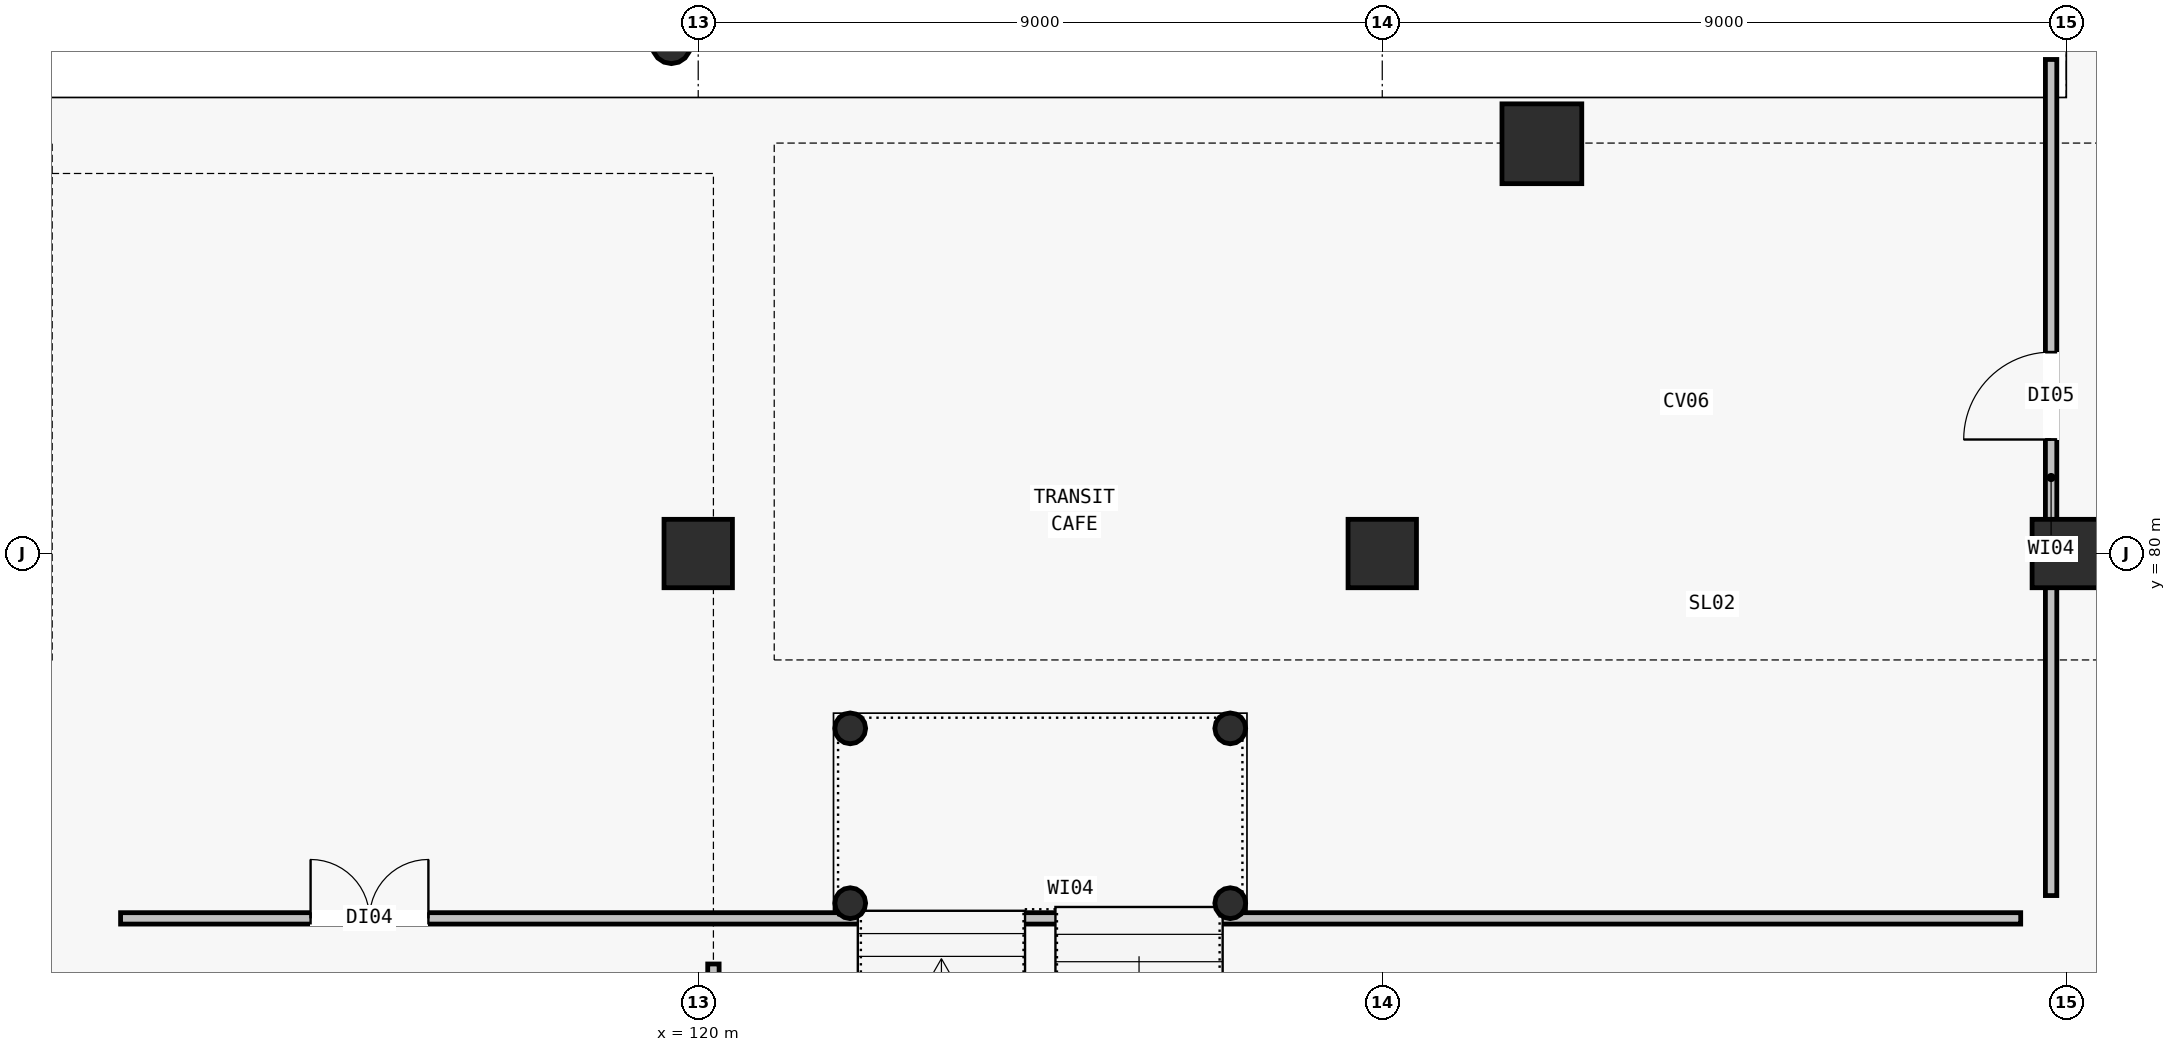
"""IFC4 building model, lengths in metres.
Left out: names, types, materials, properties, quantities, classifications, styles, units other than length and angle.
Written with IfcOpenShell. Run it as: python <this file> out.ifc"""

import sys

from ifc_helpers import new_model, si_unit, direction, frame, frame_2d, origin, origin_2d, place, context, subcontext, project, spatial, rectangle, hollow_circle, extrude, element, fill, save


model = new_model("IFC4")
c1 = context("Model", 3, precision=1e-05, world=origin(), true_north=direction((0.0, 1.0)))
c2 = subcontext(c1, "Body", "Model", "MODEL_VIEW")
j1 = project(units=[si_unit("LENGTHUNIT", "METRE"), si_unit("PLANEANGLEUNIT", "RADIAN")], contexts=[c1])
p1 = place(None, origin())
s1 = spatial("IfcSite", under=j1, at=p1, CompositionType="ELEMENT")
p2 = place(p1, origin())
s2 = spatial("IfcBuilding", under=s1, at=p2, CompositionType="ELEMENT")
p3 = place(p2, origin())
s3 = spatial("IfcBuildingStorey", under=s2, at=p3, CompositionType="ELEMENT", Elevation=0.0)
p4 = place(p3, frame((131.1, 85.391, -0.9), z_axis=(0.0, 0.0, 1.0), x_axis=(1.0, 0.0, 0.0)))
e1 = element("IfcColumn", 1, at=p4, inside=s3, PredefinedType="COLUMN", context=c2, shape_type="SweptSolid", body=[
    extrude(rectangle(XDim=1.05, YDim=1.05, at=origin_2d()), origin(), (0.0, 0.0, 1.0), 6.5),
])
p5 = place(p3, frame((119.647, 86.699, -0.9), z_axis=(0.0, 0.0, 1.0), x_axis=(1.0, 0.0, 0.0)))
e2 = element("IfcColumn", 2, at=p5, inside=s3, PredefinedType="COLUMN", context=c2, shape_type="SweptSolid", body=[
    extrude(hollow_circle(Radius=0.254, WallThickness=0.016, at=origin_2d()), origin(), (0.0, 0.0, 1.0), 6.5),
])
for number, where, z_axis, x_axis in (
    (3, (120.0, 80.0, -0.9), (0.0, 0.0, 1.0), (1.0, 0.0, 0.0)),
    (4, (129.0, 80.0, -0.9), (0.0, 0.0, 1.0), (1.0, 0.0, 0.0)),
    (5, (138.0, 80.0, -0.9), (0.0, 0.0, 1.0), (1.0, 0.0, 0.0)),
):
    element("IfcColumn", number, at=place(p3, frame(where, z_axis=z_axis, x_axis=x_axis)), inside=s3, PredefinedType="COLUMN", context=c2, shape_type="SweptSolid", body=[
        extrude(rectangle(XDim=0.9, YDim=0.9, at=origin_2d()), origin(), (0.0, 0.0, 1.0), 6.5),
    ])
for number, where, z_axis, x_axis in (
    (6, (122.0, 75.4, -0.9), (0.0, 0.0, 1.0), (1.0, 0.0, 0.0)),
    (7, (122.0, 77.7, -0.9), (0.0, 0.0, 1.0), (1.0, 0.0, 0.0)),
    (8, (127.0, 75.4, -0.9), (0.0, 0.0, 1.0), (1.0, 0.0, 0.0)),
    (9, (127.0, 77.7, -0.9), (0.0, 0.0, 1.0), (1.0, 0.0, 0.0)),
):
    element("IfcColumn", number, at=place(p3, frame(where, z_axis=z_axis, x_axis=x_axis)), inside=s3, PredefinedType="COLUMN", context=c2, shape_type="SweptSolid", body=[
        extrude(hollow_circle(Radius=0.203, WallThickness=0.014, at=origin_2d()), origin(), (0.0, 0.0, 1.0), 3.48),
    ])
p6 = place(p3, frame((120.2, 64.5, 0.0), z_axis=(0.0, 0.0, 1.0), x_axis=(0.0, 1.0, 0.0)))
e10 = element("IfcWall", 10, at=p6, inside=s3, PredefinedType="PARTITIONING", context=c2, shape_type="SweptSolid", body=[
    extrude(rectangle(XDim=10.1, YDim=0.15, at=frame_2d((5.05, 0.0))), origin(), (0.0, 0.0, 1.0), 4.2),
])
p7 = place(p6, frame((3.8, 0.0, 0.0)))
e11 = element("IfcOpeningElement", 11, at=p7, cuts=e10, PredefinedType="OPENING", context=c2, shape_type="SweptSolid", body=[
    extrude(rectangle(XDim=1.15, YDim=2.15, at=frame_2d((0.575, 1.075))), frame((0.0, 0.085, 0.0), z_axis=(0.0, -1.0, 0.0), x_axis=(1.0, 0.0, 0.0)), (0.0, 0.0, 1.0), 0.17),
])
p8 = place(p3, frame((112.4, 75.2, 0.0), z_axis=(0.0, 0.0, 1.0), x_axis=(1.0, 0.0, 0.0)))
e12 = element("IfcWall", 12, at=p8, inside=s3, PredefinedType="PARTITIONING", context=c2, shape_type="SweptSolid", body=[
    extrude(rectangle(XDim=25.0, YDim=0.15, at=frame_2d((12.5, 0.0))), origin(), (0.0, 0.0, 1.0), 4.2),
])
p9 = place(p8, frame((2.5, 0.0, 0.0)))
e13 = element("IfcOpeningElement", 13, at=p9, cuts=e12, PredefinedType="OPENING", context=c2, shape_type="SweptSolid", body=[
    extrude(rectangle(XDim=1.55, YDim=2.2, at=frame_2d((0.775, 1.1))), frame((0.0, 0.085, 0.0), z_axis=(0.0, -1.0, 0.0), x_axis=(1.0, 0.0, 0.0)), (0.0, 0.0, 1.0), 0.17),
])
p10 = place(p3, frame((137.8, 75.5, 0.0), z_axis=(0.0, 0.0, 1.0), x_axis=(0.0, 1.0, 0.0)))
e14 = element("IfcWall", 14, at=p10, inside=s3, PredefinedType="PARTITIONING", context=c2, shape_type="SweptSolid", body=[
    extrude(rectangle(XDim=11.0, YDim=0.15, at=frame_2d((5.5, 0.0))), origin(), (0.0, 0.0, 1.0), 4.2),
])
p11 = place(p10, frame((6.0, 0.0, 0.0)))
e15 = element("IfcOpeningElement", 15, at=p11, cuts=e14, PredefinedType="OPENING", context=c2, shape_type="SweptSolid", body=[
    extrude(rectangle(XDim=1.15, YDim=2.15, at=frame_2d((0.575, 1.075))), frame((0.0, 0.085, 0.0), z_axis=(0.0, -1.0, 0.0), x_axis=(1.0, 0.0, 0.0)), (0.0, 0.0, 1.0), 0.17),
])
p12 = place(p9, origin())
e16 = element("IfcDoor", 16, at=p12, inside=s3, OperationType="DOUBLE_SWING_LEFT", PredefinedType="DOOR", context=c2, shape_type="SweptSolid", body=[
    extrude(rectangle(XDim=1.55, YDim=2.2, at=frame_2d((0.775, 1.1))), frame((0.0, 0.025, 0.0), z_axis=(0.0, -1.0, 0.0), x_axis=(1.0, 0.0, 0.0)), (0.0, 0.0, 1.0), 0.05),
])
fill(e13, e16)
p13 = place(p11, origin())
e17 = element("IfcDoor", 17, at=p13, inside=s3, OperationType="SINGLE_SWING_LEFT", PredefinedType="DOOR", context=c2, shape_type="SweptSolid", body=[
    extrude(rectangle(XDim=1.15, YDim=2.15, at=frame_2d((0.575, 1.075))), frame((0.0, 0.025, 0.0), z_axis=(0.0, -1.0, 0.0), x_axis=(1.0, 0.0, 0.0)), (0.0, 0.0, 1.0), 0.05),
])
fill(e15, e17)
save(model, sys.argv[1])
